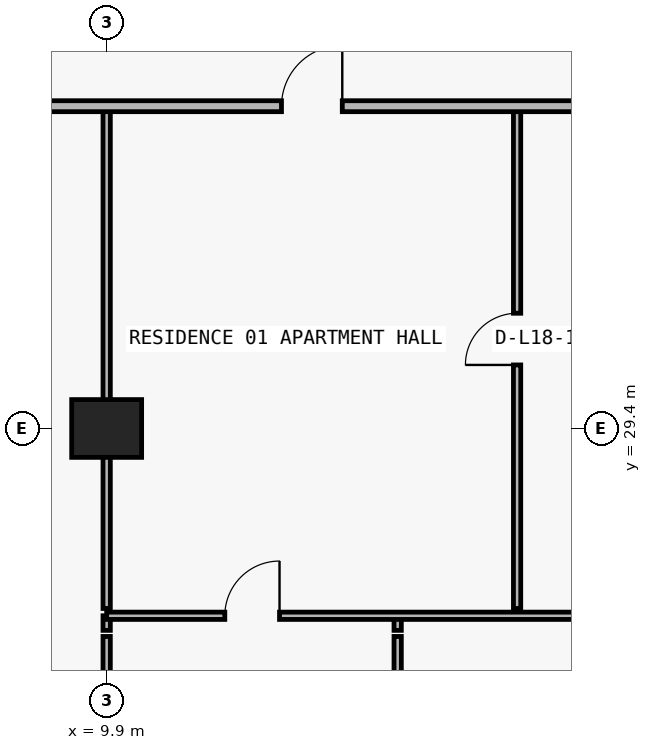
"""IFC4 building model, lengths in metres.
Left out: names, types, materials, properties, quantities, classifications, styles, units other than length and angle.
Written with IfcOpenShell. Run it as: python <this file> out.ifc"""

import sys

from ifc_helpers import new_model, si_unit, direction, frame, frame_2d, origin, origin_2d, place, context, subcontext, project, spatial, rectangle, extrude, element, fill, save


model = new_model("IFC4")
c1 = context("Model", 3, precision=1e-05, world=origin(), true_north=direction((0.0, 1.0)))
c2 = subcontext(c1, "Body", "Model", "MODEL_VIEW")
j1 = project(units=[si_unit("LENGTHUNIT", "METRE"), si_unit("PLANEANGLEUNIT", "RADIAN")], contexts=[c1])
p1 = place(None, origin())
s1 = spatial("IfcSite", under=j1, at=p1, CompositionType="ELEMENT")
p2 = place(p1, origin())
s2 = spatial("IfcBuilding", under=s1, at=p2, CompositionType="ELEMENT")
p3 = place(p2, frame((0.0, 0.0, 69.6)))
s3 = spatial("IfcBuildingStorey", under=s2, at=p3, CompositionType="ELEMENT", Elevation=69.6)
p4 = place(p3, frame((9.9, 29.4, 0.0), z_axis=(0.0, 0.0, 1.0), x_axis=(1.0, 0.0, 0.0)))
e1 = element("IfcColumn", 1, at=p4, inside=s3, PredefinedType="COLUMN", context=c2, shape_type="SweptSolid", body=[
    extrude(rectangle(XDim=1.15, YDim=0.95, at=origin_2d()), origin(), (0.0, 0.0, 1.0), 3.05),
])
p5 = place(p3, frame((9.9, 21.29, 0.0), z_axis=(0.0, 0.0, 1.0), x_axis=(0.0, 1.0, 0.0)))
e2 = element("IfcWall", 2, at=p5, inside=s3, PredefinedType="PARTITIONING", context=c2, shape_type="SweptSolid", body=[
    extrude(rectangle(XDim=4.69, YDim=0.12, at=frame_2d((2.345, 0.0))), origin(), (0.0, 0.0, 1.0), 2.11),
])
p6 = place(p5, frame((1.895, 0.0, 0.0)))
e3 = element("IfcOpeningElement", 3, at=p6, cuts=e2, PredefinedType="OPENING", context=c2, shape_type="SweptSolid", body=[
    extrude(rectangle(XDim=0.9, YDim=2.06, at=frame_2d((0.45, 1.03))), frame((0.0, 0.07, 0.0), z_axis=(0.0, -1.0, 0.0), x_axis=(1.0, 0.0, 0.0)), (0.0, 0.0, 1.0), 0.14),
])
p7 = place(p3, frame((9.9, 26.08, 0.0), z_axis=(0.0, 0.0, 1.0), x_axis=(0.0, 1.0, 0.0)))
e4 = element("IfcWall", 4, at=p7, inside=s3, PredefinedType="PARTITIONING", context=c2, shape_type="SweptSolid", body=[
    extrude(rectangle(XDim=0.24, YDim=0.12, at=frame_2d((0.12, 0.0))), origin(), (0.0, 0.0, 1.0), 2.11),
])
p8 = place(p3, frame((9.9, 26.44, 0.0), z_axis=(0.0, 0.0, 1.0), x_axis=(0.0, 1.0, 0.0)))
e5 = element("IfcWall", 5, at=p8, inside=s3, PredefinedType="PARTITIONING", context=c2, shape_type="SweptSolid", body=[
    extrude(rectangle(XDim=8.26, YDim=0.12, at=frame_2d((4.13, 0.0))), origin(), (0.0, 0.0, 1.0), 2.11),
])
p9 = place(p3, frame((14.686, 21.29, 0.0), z_axis=(0.0, 0.0, 1.0), x_axis=(0.0, 1.0, 0.0)))
e6 = element("IfcWall", 6, at=p9, inside=s3, PredefinedType="PARTITIONING", context=c2, shape_type="SweptSolid", body=[
    extrude(rectangle(XDim=4.69, YDim=0.12, at=frame_2d((2.345, 0.0))), origin(), (0.0, 0.0, 1.0), 3.05),
])
p10 = place(p9, frame((1.895, 0.0, 0.0)))
e7 = element("IfcOpeningElement", 7, at=p10, cuts=e6, PredefinedType="OPENING", context=c2, shape_type="SweptSolid", body=[
    extrude(rectangle(XDim=0.9, YDim=2.15, at=frame_2d((0.45, 1.075))), frame((0.0, 0.07, 0.0), z_axis=(0.0, -1.0, 0.0), x_axis=(1.0, 0.0, 0.0)), (0.0, 0.0, 1.0), 0.14),
])
p11 = place(p3, frame((14.686, 26.08, 0.0), z_axis=(0.0, 0.0, 1.0), x_axis=(0.0, 1.0, 0.0)))
e8 = element("IfcWall", 8, at=p11, inside=s3, PredefinedType="PARTITIONING", context=c2, shape_type="SweptSolid", body=[
    extrude(rectangle(XDim=0.24, YDim=0.12, at=frame_2d((0.12, 0.0))), origin(), (0.0, 0.0, 1.0), 3.05),
])
p12 = place(p3, frame((16.65, 26.44, 0.0), z_axis=(0.0, 0.0, 1.0), x_axis=(0.0, 1.0, 0.0)))
e9 = element("IfcWall", 9, at=p12, inside=s3, PredefinedType="PARTITIONING", context=c2, shape_type="SweptSolid", body=[
    extrude(rectangle(XDim=8.26, YDim=0.12, at=frame_2d((4.13, 0.0))), origin(), (0.0, 0.0, 1.0), 3.05),
])
p13 = place(p12, frame((4.005, 0.0, 0.0)))
e10 = element("IfcOpeningElement", 10, at=p13, cuts=e9, PredefinedType="OPENING", context=c2, shape_type="SweptSolid", body=[
    extrude(rectangle(XDim=0.85, YDim=2.1, at=frame_2d((0.425, 1.05))), frame((0.0, 0.07, 0.0), z_axis=(0.0, -1.0, 0.0), x_axis=(1.0, 0.0, 0.0)), (0.0, 0.0, 1.0), 0.14),
])
p14 = place(p3, frame((9.9, 26.32, 0.0), z_axis=(0.0, 0.0, 1.0), x_axis=(1.0, 0.0, 0.0)))
e11 = element("IfcWall", 11, at=p14, inside=s3, PredefinedType="PARTITIONING", context=c2, shape_type="SweptSolid", body=[
    extrude(rectangle(XDim=8.4, YDim=0.12, at=frame_2d((4.2, 0.0))), origin(), (0.0, 0.0, 1.0), 3.05),
])
p15 = place(p14, frame((1.943, 0.0, 0.0)))
e12 = element("IfcOpeningElement", 12, at=p15, cuts=e11, PredefinedType="OPENING", context=c2, shape_type="SweptSolid", body=[
    extrude(rectangle(XDim=0.9, YDim=2.15, at=frame_2d((0.45, 1.075))), frame((0.0, 0.07, 0.0), z_axis=(0.0, -1.0, 0.0), x_axis=(1.0, 0.0, 0.0)), (0.0, 0.0, 1.0), 0.14),
])
p16 = place(p3, frame((5.105, 34.7, 0.0), z_axis=(0.0, 0.0, 1.0), x_axis=(1.0, 0.0, 0.0)))
e13 = element("IfcWall", 13, at=p16, inside=s3, PredefinedType="PARTITIONING", context=c2, shape_type="SweptSolid", body=[
    extrude(rectangle(XDim=67.595, YDim=0.18, at=frame_2d((33.797, 0.0))), origin(), (0.0, 0.0, 1.0), 3.05),
])
p17 = place(p16, frame((7.67, 0.0, 0.0)))
e14 = element("IfcOpeningElement", 14, at=p17, cuts=e13, PredefinedType="OPENING", context=c2, shape_type="SweptSolid", body=[
    extrude(rectangle(XDim=1.0, YDim=2.2, at=frame_2d((0.5, 1.1))), frame((0.0, 0.1, 0.0), z_axis=(0.0, -1.0, 0.0), x_axis=(1.0, 0.0, 0.0)), (0.0, 0.0, 1.0), 0.2),
])
p18 = place(p16, frame((16.07, 0.0, 0.0)))
e15 = element("IfcOpeningElement", 15, at=p18, cuts=e13, PredefinedType="OPENING", context=c2, shape_type="SweptSolid", body=[
    extrude(rectangle(XDim=1.0, YDim=2.2, at=frame_2d((0.5, 1.1))), frame((0.0, 0.1, 0.0), z_axis=(0.0, -1.0, 0.0), x_axis=(1.0, 0.0, 0.0)), (0.0, 0.0, 1.0), 0.2),
])
p19 = place(p16, frame((24.47, 0.0, 0.0)))
e16 = element("IfcOpeningElement", 16, at=p19, cuts=e13, PredefinedType="OPENING", context=c2, shape_type="SweptSolid", body=[
    extrude(rectangle(XDim=1.0, YDim=2.2, at=frame_2d((0.5, 1.1))), frame((0.0, 0.1, 0.0), z_axis=(0.0, -1.0, 0.0), x_axis=(1.0, 0.0, 0.0)), (0.0, 0.0, 1.0), 0.2),
])
p20 = place(p16, frame((32.47, 0.0, 0.0)))
e17 = element("IfcOpeningElement", 17, at=p20, cuts=e13, PredefinedType="OPENING", context=c2, shape_type="SweptSolid", body=[
    extrude(rectangle(XDim=1.0, YDim=2.2, at=frame_2d((0.5, 1.1))), frame((0.0, 0.1, 0.0), z_axis=(0.0, -1.0, 0.0), x_axis=(1.0, 0.0, 0.0)), (0.0, 0.0, 1.0), 0.2),
])
p21 = place(p16, frame((40.47, 0.0, 0.0)))
e18 = element("IfcOpeningElement", 18, at=p21, cuts=e13, PredefinedType="OPENING", context=c2, shape_type="SweptSolid", body=[
    extrude(rectangle(XDim=1.0, YDim=2.2, at=frame_2d((0.5, 1.1))), frame((0.0, 0.1, 0.0), z_axis=(0.0, -1.0, 0.0), x_axis=(1.0, 0.0, 0.0)), (0.0, 0.0, 1.0), 0.2),
])
p22 = place(p16, frame((48.87, 0.0, 0.0)))
e19 = element("IfcOpeningElement", 19, at=p22, cuts=e13, PredefinedType="OPENING", context=c2, shape_type="SweptSolid", body=[
    extrude(rectangle(XDim=1.0, YDim=2.2, at=frame_2d((0.5, 1.1))), frame((0.0, 0.1, 0.0), z_axis=(0.0, -1.0, 0.0), x_axis=(1.0, 0.0, 0.0)), (0.0, 0.0, 1.0), 0.2),
])
p23 = place(p16, frame((57.27, 0.0, 0.0)))
e20 = element("IfcOpeningElement", 20, at=p23, cuts=e13, PredefinedType="OPENING", context=c2, shape_type="SweptSolid", body=[
    extrude(rectangle(XDim=1.0, YDim=2.2, at=frame_2d((0.5, 1.1))), frame((0.0, 0.1, 0.0), z_axis=(0.0, -1.0, 0.0), x_axis=(1.0, 0.0, 0.0)), (0.0, 0.0, 1.0), 0.2),
])
p24 = place(p17, origin())
e21 = element("IfcDoor", 21, at=p24, inside=s3, OperationType="SINGLE_SWING_RIGHT", PredefinedType="DOOR", context=c2, shape_type="SweptSolid", body=[
    extrude(rectangle(XDim=1.0, YDim=2.2, at=frame_2d((0.5, 1.1))), frame((0.0, 0.025, 0.0), z_axis=(0.0, -1.0, 0.0), x_axis=(1.0, 0.0, 0.0)), (0.0, 0.0, 1.0), 0.05),
])
fill(e14, e21)
p25 = place(p13, origin())
e22 = element("IfcDoor", 22, at=p25, inside=s3, OperationType="SINGLE_SWING_LEFT", PredefinedType="DOOR", context=c2, shape_type="SweptSolid", body=[
    extrude(rectangle(XDim=0.85, YDim=2.1, at=frame_2d((0.425, 1.05))), frame((0.0, 0.025, 0.0), z_axis=(0.0, -1.0, 0.0), x_axis=(1.0, 0.0, 0.0)), (0.0, 0.0, 1.0), 0.05),
])
fill(e10, e22)
p26 = place(p15, origin())
e23 = element("IfcDoor", 23, at=p26, inside=s3, OperationType="SINGLE_SWING_RIGHT", PredefinedType="DOOR", context=c2, shape_type="SweptSolid", body=[
    extrude(rectangle(XDim=0.9, YDim=2.15, at=frame_2d((0.45, 1.075))), frame((0.0, 0.025, 0.0), z_axis=(0.0, -1.0, 0.0), x_axis=(1.0, 0.0, 0.0)), (0.0, 0.0, 1.0), 0.05),
])
fill(e12, e23)
save(model, sys.argv[1])
